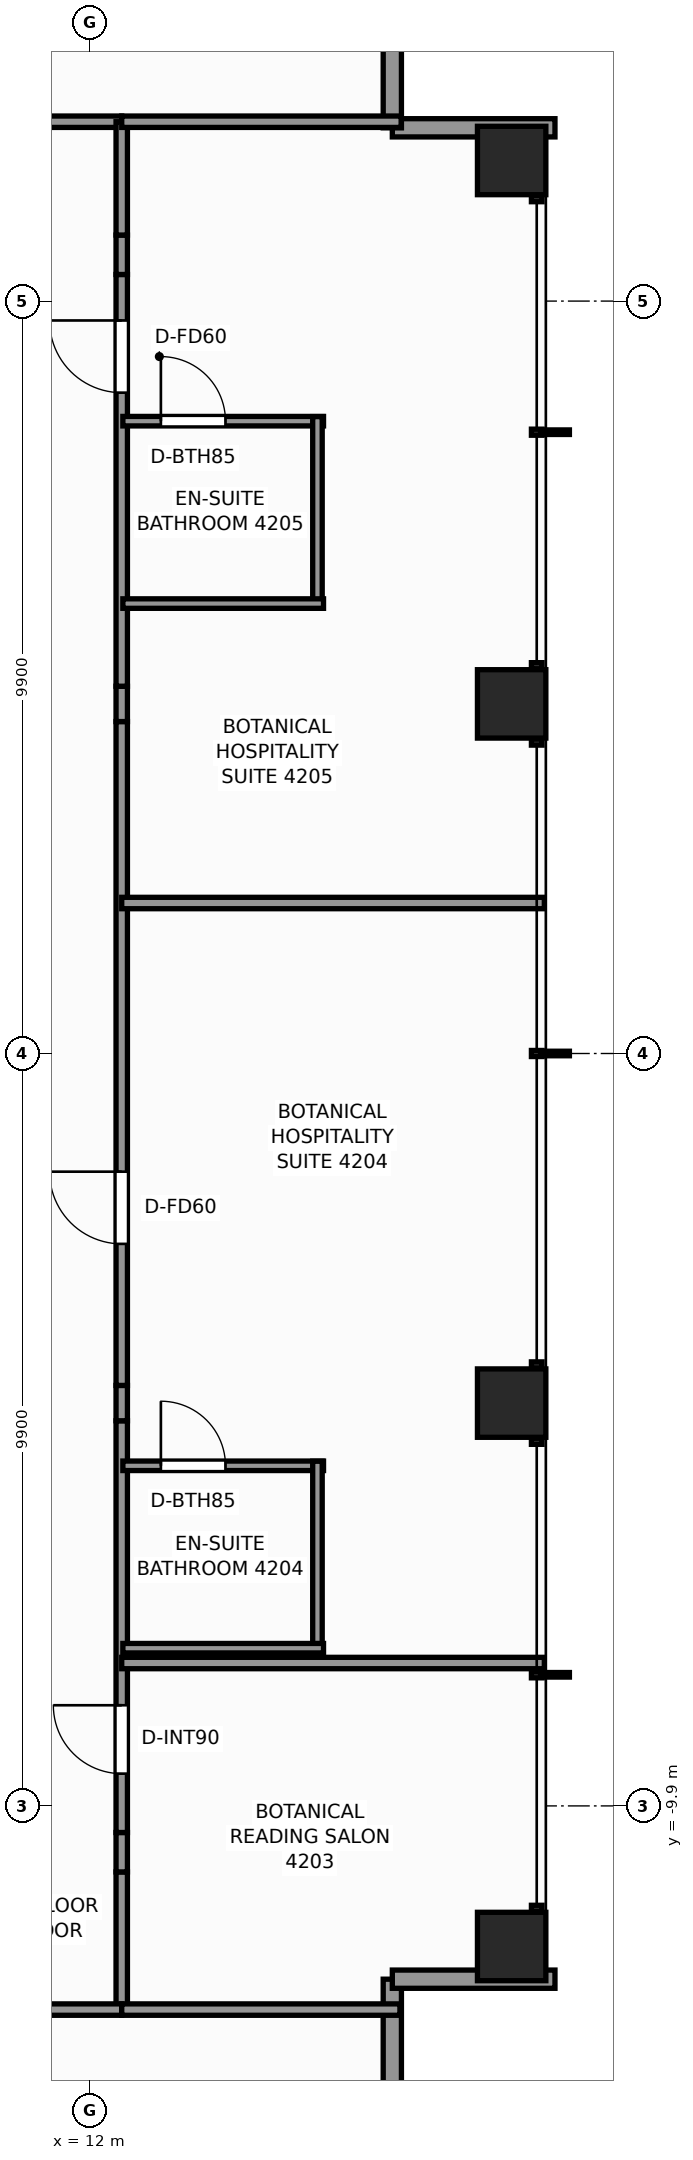
"""IFC4 building model, lengths in metres.
Left out: names, types, materials, properties, quantities, classifications, styles, units other than length and angle.
Written with IfcOpenShell. Run it as: python <this file> out.ifc"""

import sys

from ifc_helpers import new_model, si_unit, direction, frame, frame_2d, origin, origin_2d, place, context, subcontext, project, spatial, rectangle, extrude, element, fill, save


model = new_model("IFC4")
c1 = context("Model", 3, precision=1e-05, world=origin(), true_north=direction((0.0, 1.0)))
c2 = subcontext(c1, "Body", "Model", "MODEL_VIEW")
j1 = project(units=[si_unit("LENGTHUNIT", "METRE"), si_unit("PLANEANGLEUNIT", "RADIAN")], contexts=[c1])
p1 = place(None, origin())
s1 = spatial("IfcSite", under=j1, at=p1, CompositionType="ELEMENT")
p2 = place(p1, origin())
s2 = spatial("IfcBuilding", under=s1, at=p2, CompositionType="ELEMENT")
p3 = place(p2, frame((0.0, 0.0, 144.8)))
s3 = spatial("IfcBuildingStorey", under=s2, at=p3, CompositionType="ELEMENT", Elevation=144.8)
for number, where, z_axis, x_axis in (
    (1, (17.55, -11.75, 0.0), (0.0, 0.0, 1.0), (1.0, 0.0, 0.0)),
    (2, (17.55, -4.6, 0.0), (0.0, 0.0, 1.0), (1.0, 0.0, 0.0)),
    (3, (17.55, 4.6, 0.0), (0.0, 0.0, 1.0), (1.0, 0.0, 0.0)),
    (4, (17.55, 11.75, 0.0), (0.0, 0.0, 1.0), (1.0, 0.0, 0.0)),
):
    element("IfcColumn", number, at=place(p3, frame(where, z_axis=z_axis, x_axis=x_axis)), inside=s3, PredefinedType="COLUMN", context=c2, shape_type="SweptSolid", body=[
        extrude(rectangle(XDim=0.9, YDim=0.9, at=origin_2d()), origin(), (0.0, 0.0, 1.0), 3.3),
    ])
for number, where, z_axis, x_axis in (
    (5, (15.98, -12.18, 0.0), (0.0, 0.0, 1.0), (0.0, -1.0, 0.0)),
    (6, (18.12, -12.18, 0.0), (0.0, 0.0, 1.0), (-1.0, 0.0, 0.0)),
    (7, (15.98, 12.18, 0.0), (0.0, 0.0, 1.0), (1.0, 0.0, 0.0)),
    (8, (15.98, 14.32, 0.0), (0.0, 0.0, 1.0), (0.0, -1.0, 0.0)),
):
    element("IfcWall", number, at=place(p3, frame(where, z_axis=z_axis, x_axis=x_axis)), inside=s3, PredefinedType="STANDARD", context=c2, shape_type="SweptSolid", body=[
        extrude(rectangle(XDim=2.14, YDim=0.24, at=frame_2d((1.07, 0.0))), origin(), (0.0, 0.0, 1.0), 2.329),
    ])
p4 = place(p3, frame((10.73, 12.26, 0.0), z_axis=(0.0, 0.0, 1.0), x_axis=(1.0, 0.0, 0.0)))
e9 = element("IfcWall", 9, at=p4, inside=s3, PredefinedType="PARTITIONING", context=c2, shape_type="SweptSolid", body=[
    extrude(rectangle(XDim=1.69, YDim=0.15, at=frame_2d((0.845, 0.0))), origin(), (0.0, 0.0, 1.0), 2.95),
])
p5 = place(p3, frame((12.42, -12.58, 0.0), z_axis=(0.0, 0.0, 1.0), x_axis=(0.0, 1.0, 0.0)))
e10 = element("IfcWall", 10, at=p5, inside=s3, PredefinedType="PARTITIONING", context=c2, shape_type="SweptSolid", body=[
    extrude(rectangle(XDim=1.811, YDim=0.15, at=frame_2d((0.906, 0.0))), origin(), (0.0, 0.0, 1.0), 2.95),
])
p6 = place(p3, frame((12.42, -10.769, 0.0), z_axis=(0.0, 0.0, 1.0), x_axis=(0.0, 1.0, 0.0)))
e11 = element("IfcWall", 11, at=p6, inside=s3, PredefinedType="PARTITIONING", context=c2, shape_type="SweptSolid", body=[
    extrude(rectangle(XDim=0.519, YDim=0.15, at=frame_2d((0.259, 0.0))), origin(), (0.0, 0.0, 1.0), 2.162),
])
p7 = place(p3, frame((12.42, -10.25, 0.0), z_axis=(0.0, 0.0, 1.0), x_axis=(0.0, 1.0, 0.0)))
e12 = element("IfcWall", 12, at=p7, inside=s3, PredefinedType="PARTITIONING", context=c2, shape_type="SweptSolid", body=[
    extrude(rectangle(XDim=5.417, YDim=0.15, at=frame_2d((2.709, 0.0))), origin(), (0.0, 0.0, 1.0), 2.95),
])
p8 = place(p7, frame((0.774, 0.0, 0.0)))
e13 = element("IfcOpeningElement", 13, at=p8, cuts=e12, PredefinedType="OPENING", context=c2, shape_type="SweptSolid", body=[
    extrude(rectangle(XDim=0.9, YDim=2.06, at=frame_2d((0.45, 1.03))), frame((0.0, 0.085, 0.0), z_axis=(0.0, -1.0, 0.0), x_axis=(1.0, 0.0, 0.0)), (0.0, 0.0, 1.0), 0.17),
])
p9 = place(p3, frame((12.42, -4.833, 0.0), z_axis=(0.0, 0.0, 1.0), x_axis=(0.0, 1.0, 0.0)))
e14 = element("IfcWall", 14, at=p9, inside=s3, PredefinedType="PARTITIONING", context=c2, shape_type="SweptSolid", body=[
    extrude(rectangle(XDim=0.465, YDim=0.15, at=frame_2d((0.232, 0.0))), origin(), (0.0, 0.0, 1.0), 2.162),
])
p10 = place(p3, frame((12.42, -4.367, 0.0), z_axis=(0.0, 0.0, 1.0), x_axis=(0.0, 1.0, 0.0)))
e15 = element("IfcWall", 15, at=p10, inside=s3, PredefinedType="PARTITIONING", context=c2, shape_type="SweptSolid", body=[
    extrude(rectangle(XDim=8.735, YDim=0.15, at=frame_2d((4.367, 0.0))), origin(), (0.0, 0.0, 1.0), 2.475),
])
p11 = place(p10, frame((1.863, 0.0, 0.0)))
e16 = element("IfcOpeningElement", 16, at=p11, cuts=e15, PredefinedType="OPENING", context=c2, shape_type="SweptSolid", body=[
    extrude(rectangle(XDim=0.95, YDim=2.06, at=frame_2d((0.475, 1.03))), frame((0.0, 0.085, 0.0), z_axis=(0.0, -1.0, 0.0), x_axis=(1.0, 0.0, 0.0)), (0.0, 0.0, 1.0), 0.17),
])
p12 = place(p3, frame((12.42, 4.367, 0.0), z_axis=(0.0, 0.0, 1.0), x_axis=(0.0, 1.0, 0.0)))
e17 = element("IfcWall", 17, at=p12, inside=s3, PredefinedType="PARTITIONING", context=c2, shape_type="SweptSolid", body=[
    extrude(rectangle(XDim=0.465, YDim=0.15, at=frame_2d((0.232, 0.0))), origin(), (0.0, 0.0, 1.0), 2.162),
])
p13 = place(p3, frame((12.42, 4.833, 0.0), z_axis=(0.0, 0.0, 1.0), x_axis=(0.0, 1.0, 0.0)))
e18 = element("IfcWall", 18, at=p13, inside=s3, PredefinedType="PARTITIONING", context=c2, shape_type="SweptSolid", body=[
    extrude(rectangle(XDim=5.417, YDim=0.15, at=frame_2d((2.709, 0.0))), origin(), (0.0, 0.0, 1.0), 2.95),
])
p14 = place(p13, frame((3.863, 0.0, 0.0)))
e19 = element("IfcOpeningElement", 19, at=p14, cuts=e18, PredefinedType="OPENING", context=c2, shape_type="SweptSolid", body=[
    extrude(rectangle(XDim=0.95, YDim=2.06, at=frame_2d((0.475, 1.03))), frame((0.0, 0.085, 0.0), z_axis=(0.0, -1.0, 0.0), x_axis=(1.0, 0.0, 0.0)), (0.0, 0.0, 1.0), 0.17),
])
p15 = place(p3, frame((12.42, 10.25, 0.0), z_axis=(0.0, 0.0, 1.0), x_axis=(0.0, 1.0, 0.0)))
e20 = element("IfcWall", 20, at=p15, inside=s3, PredefinedType="PARTITIONING", context=c2, shape_type="SweptSolid", body=[
    extrude(rectangle(XDim=0.519, YDim=0.15, at=frame_2d((0.259, 0.0))), origin(), (0.0, 0.0, 1.0), 2.162),
])
p16 = place(p3, frame((12.42, 10.769, 0.0), z_axis=(0.0, 0.0, 1.0), x_axis=(0.0, 1.0, 0.0)))
e21 = element("IfcWall", 21, at=p16, inside=s3, PredefinedType="PARTITIONING", context=c2, shape_type="SweptSolid", body=[
    extrude(rectangle(XDim=1.491, YDim=0.15, at=frame_2d((0.746, 0.0))), origin(), (0.0, 0.0, 1.0), 2.95),
])
p17 = place(p3, frame((10.808, -12.58, 0.0), z_axis=(0.0, 0.0, 1.0), x_axis=(1.0, 0.0, 0.0)))
e22 = element("IfcWall", 22, at=p17, inside=s3, PredefinedType="PARTITIONING", context=c2, shape_type="SweptSolid", body=[
    extrude(rectangle(XDim=1.612, YDim=0.15, at=frame_2d((0.806, 0.0))), origin(), (0.0, 0.0, 1.0), 2.95),
])
p18 = place(p3, frame((12.42, -12.58, 0.0), z_axis=(0.0, 0.0, 1.0), x_axis=(1.0, 0.0, 0.0)))
e23 = element("IfcWall", 23, at=p18, inside=s3, PredefinedType="PARTITIONING", context=c2, shape_type="SweptSolid", body=[
    extrude(rectangle(XDim=3.66, YDim=0.15, at=frame_2d((1.83, 0.0))), origin(), (0.0, 0.0, 1.0), 2.95),
])
p19 = place(p3, frame((12.42, 12.26, 0.0), z_axis=(0.0, 0.0, 1.0), x_axis=(1.0, 0.0, 0.0)))
e24 = element("IfcWall", 24, at=p19, inside=s3, PredefinedType="PARTITIONING", context=c2, shape_type="SweptSolid", body=[
    extrude(rectangle(XDim=3.676, YDim=0.15, at=frame_2d((1.838, 0.0))), origin(), (0.0, 0.0, 1.0), 2.95),
])
for number, where, z_axis, x_axis in (
    (25, (12.42, -8.02, 0.0), (0.0, 0.0, 1.0), (1.0, 0.0, 0.0)),
    (26, (12.42, 1.98, 0.0), (0.0, 0.0, 1.0), (1.0, 0.0, 0.0)),
):
    element("IfcWall", number, at=place(p3, frame(where, z_axis=z_axis, x_axis=x_axis)), inside=s3, PredefinedType="PARTITIONING", context=c2, shape_type="SweptSolid", body=[
        extrude(rectangle(XDim=5.56, YDim=0.15, at=frame_2d((2.78, 0.0))), origin(), (0.0, 0.0, 1.0), 2.319),
    ])
p20 = place(p3, frame((12.435, -5.425, 0.0), z_axis=(0.0, 0.0, 1.0), x_axis=(1.0, 0.0, 0.0)))
e27 = element("IfcWall", 27, at=p20, inside=s3, PredefinedType="PARTITIONING", context=c2, shape_type="SweptSolid", body=[
    extrude(rectangle(XDim=2.64, YDim=0.125, at=frame_2d((1.32, 0.0))), origin(), (0.0, 0.0, 1.0), 2.95),
])
p21 = place(p20, frame((0.5, 0.0, 0.0)))
e28 = element("IfcOpeningElement", 28, at=p21, cuts=e27, PredefinedType="OPENING", context=c2, shape_type="SweptSolid", body=[
    extrude(rectangle(XDim=0.85, YDim=2.03, at=frame_2d((0.425, 1.015))), frame((0.0, 0.073, 0.0), z_axis=(0.0, -1.0, 0.0), x_axis=(1.0, 0.0, 0.0)), (0.0, 0.0, 1.0), 0.145),
])
p22 = place(p3, frame((14.995, -7.885, 0.0), z_axis=(0.0, 0.0, 1.0), x_axis=(0.0, 1.0, 0.0)))
e29 = element("IfcWall", 29, at=p22, inside=s3, PredefinedType="PARTITIONING", context=c2, shape_type="SweptSolid", body=[
    extrude(rectangle(XDim=2.52, YDim=0.125, at=frame_2d((1.26, 0.0))), origin(), (0.0, 0.0, 1.0), 2.95),
])
p23 = place(p3, frame((12.435, -7.825, 0.0), z_axis=(0.0, 0.0, 1.0), x_axis=(1.0, 0.0, 0.0)))
e30 = element("IfcWall", 30, at=p23, inside=s3, PredefinedType="PARTITIONING", context=c2, shape_type="SweptSolid", body=[
    extrude(rectangle(XDim=2.64, YDim=0.125, at=frame_2d((1.32, 0.0))), origin(), (0.0, 0.0, 1.0), 2.95),
])
p24 = place(p3, frame((12.435, 8.32, 0.0), z_axis=(0.0, 0.0, 1.0), x_axis=(1.0, 0.0, 0.0)))
e31 = element("IfcWall", 31, at=p24, inside=s3, PredefinedType="PARTITIONING", context=c2, shape_type="SweptSolid", body=[
    extrude(rectangle(XDim=2.64, YDim=0.125, at=frame_2d((1.32, 0.0))), origin(), (0.0, 0.0, 1.0), 2.95),
])
p25 = place(p24, frame((0.5, 0.0, 0.0)))
e32 = element("IfcOpeningElement", 32, at=p25, cuts=e31, PredefinedType="OPENING", context=c2, shape_type="SweptSolid", body=[
    extrude(rectangle(XDim=0.85, YDim=2.03, at=frame_2d((0.425, 1.015))), frame((0.0, 0.073, 0.0), z_axis=(0.0, -1.0, 0.0), x_axis=(1.0, 0.0, 0.0)), (0.0, 0.0, 1.0), 0.145),
])
p26 = place(p3, frame((14.995, 5.86, 0.0), z_axis=(0.0, 0.0, 1.0), x_axis=(0.0, 1.0, 0.0)))
e33 = element("IfcWall", 33, at=p26, inside=s3, PredefinedType="PARTITIONING", context=c2, shape_type="SweptSolid", body=[
    extrude(rectangle(XDim=2.52, YDim=0.125, at=frame_2d((1.26, 0.0))), origin(), (0.0, 0.0, 1.0), 2.95),
])
p27 = place(p3, frame((12.435, 5.92, 0.0), z_axis=(0.0, 0.0, 1.0), x_axis=(1.0, 0.0, 0.0)))
e34 = element("IfcWall", 34, at=p27, inside=s3, PredefinedType="PARTITIONING", context=c2, shape_type="SweptSolid", body=[
    extrude(rectangle(XDim=2.64, YDim=0.125, at=frame_2d((1.32, 0.0))), origin(), (0.0, 0.0, 1.0), 2.95),
])
p28 = place(p8, origin())
e35 = element("IfcDoor", 35, at=p28, inside=s3, OperationType="SINGLE_SWING_RIGHT", PredefinedType="DOOR", context=c2, shape_type="SweptSolid", body=[
    extrude(rectangle(XDim=0.9, YDim=2.06, at=frame_2d((0.45, 1.03))), frame((0.0, 0.025, 0.0), z_axis=(0.0, -1.0, 0.0), x_axis=(1.0, 0.0, 0.0)), (0.0, 0.0, 1.0), 0.05),
])
fill(e13, e35)
p29 = place(p21, origin())
e36 = element("IfcDoor", 36, at=p29, inside=s3, OperationType="SINGLE_SWING_LEFT", PredefinedType="DOOR", context=c2, shape_type="SweptSolid", body=[
    extrude(rectangle(XDim=0.85, YDim=2.03, at=frame_2d((0.425, 1.015))), frame((0.0, 0.025, 0.0), z_axis=(0.0, -1.0, 0.0), x_axis=(1.0, 0.0, 0.0)), (0.0, 0.0, 1.0), 0.05),
])
fill(e28, e36)
p30 = place(p11, origin())
e37 = element("IfcDoor", 37, at=p30, inside=s3, OperationType="SINGLE_SWING_RIGHT", PredefinedType="DOOR", context=c2, shape_type="SweptSolid", body=[
    extrude(rectangle(XDim=0.95, YDim=2.06, at=frame_2d((0.475, 1.03))), frame((0.0, 0.025, 0.0), z_axis=(0.0, -1.0, 0.0), x_axis=(1.0, 0.0, 0.0)), (0.0, 0.0, 1.0), 0.05),
])
fill(e16, e37)
p31 = place(p25, origin())
e38 = element("IfcDoor", 38, at=p31, inside=s3, OperationType="SINGLE_SWING_LEFT", PredefinedType="DOOR", context=c2, shape_type="SweptSolid", body=[
    extrude(rectangle(XDim=0.85, YDim=2.03, at=frame_2d((0.425, 1.015))), frame((0.0, 0.025, 0.0), z_axis=(0.0, -1.0, 0.0), x_axis=(1.0, 0.0, 0.0)), (0.0, 0.0, 1.0), 0.05),
])
fill(e32, e38)
p32 = place(p14, origin())
e39 = element("IfcDoor", 39, at=p32, inside=s3, OperationType="SINGLE_SWING_RIGHT", PredefinedType="DOOR", context=c2, shape_type="SweptSolid", body=[
    extrude(rectangle(XDim=0.95, YDim=2.06, at=frame_2d((0.475, 1.03))), frame((0.0, 0.025, 0.0), z_axis=(0.0, -1.0, 0.0), x_axis=(1.0, 0.0, 0.0)), (0.0, 0.0, 1.0), 0.05),
])
fill(e19, e39)
save(model, sys.argv[1])
